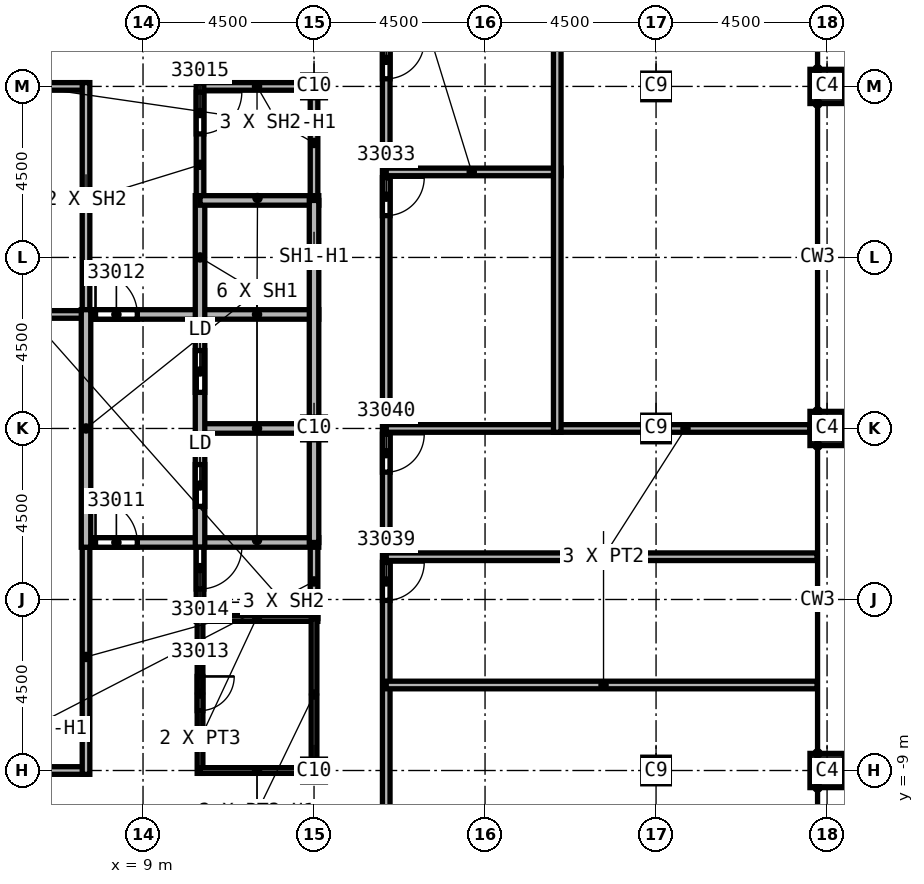
"""IFC4 building model, lengths in metres.
Left out: names, types, materials, properties, quantities, classifications, styles, units other than length and angle.
Written with IfcOpenShell. Run it as: python <this file> out.ifc"""

import sys

from ifc_helpers import new_model, si_unit, direction, frame, frame_2d, origin, origin_2d, place, context, subcontext, project, spatial, rectangle, extrude, element, fill, save


model = new_model("IFC4")
c1 = context("Model", 3, precision=1e-05, world=origin(), true_north=direction((0.0, 1.0)))
c2 = subcontext(c1, "Body", "Model", "MODEL_VIEW")
j1 = project(units=[si_unit("LENGTHUNIT", "METRE"), si_unit("PLANEANGLEUNIT", "RADIAN")], contexts=[c1])
p1 = place(None, origin())
s1 = spatial("IfcSite", under=j1, at=p1, CompositionType="ELEMENT")
p2 = place(p1, origin())
s2 = spatial("IfcBuilding", under=s1, at=p2, CompositionType="ELEMENT")
p3 = place(p2, frame((0.0, 0.0, 361.0)))
s3 = spatial("IfcBuildingStorey", under=s2, at=p3, CompositionType="ELEMENT", Elevation=361.0)
for number, where, z_axis, x_axis in (
    (1, (22.5, 0.0, 0.0), (0.0, 0.0, 1.0), (1.0, 0.0, 0.0)),
    (2, (22.5, 9.0, 0.0), (0.0, 0.0, 1.0), (1.0, 0.0, 0.0)),
    (3, (22.5, -9.0, 0.0), (0.0, 0.0, 1.0), (1.0, 0.0, 0.0)),
):
    element("IfcColumn", number, at=place(p3, frame(where, z_axis=z_axis, x_axis=x_axis)), inside=s3, PredefinedType="COLUMN", context=c2, shape_type="SweptSolid", body=[
        extrude(rectangle(XDim=0.7, YDim=0.7, at=origin_2d()), origin(), (0.0, 0.0, 1.0), 4.6),
    ])
for number, where, z_axis, x_axis in (
    (4, (13.5, 0.0, 0.0), (0.0, 0.0, 1.0), (1.0, 0.0, 0.0)),
    (5, (13.5, 9.0, 0.0), (0.0, 0.0, 1.0), (1.0, 0.0, 0.0)),
    (6, (13.5, -9.0, 0.0), (0.0, 0.0, 1.0), (1.0, 0.0, 0.0)),
):
    element("IfcColumn", number, at=place(p3, frame(where, z_axis=z_axis, x_axis=x_axis)), inside=s3, PredefinedType="COLUMN", context=c2, shape_type="SweptSolid", body=[
        extrude(rectangle(XDim=0.6, YDim=0.6, at=origin_2d()), origin(), (0.0, 0.0, 1.0), 4.6),
    ])
for number, where, z_axis, x_axis in (
    (7, (27.0, 0.0, 0.0), (0.0, 0.0, 1.0), (0.0, 1.0, 0.0)),
    (8, (27.0, 9.0, 0.0), (0.0, 0.0, 1.0), (0.0, 1.0, 0.0)),
    (9, (27.0, -9.0, 0.0), (0.0, 0.0, 1.0), (0.0, 1.0, 0.0)),
):
    element("IfcColumn", number, at=place(p3, frame(where, z_axis=z_axis, x_axis=x_axis)), inside=s3, PredefinedType="COLUMN", context=c2, shape_type="SweptSolid", body=[
        extrude(rectangle(XDim=0.9, YDim=0.9, at=origin_2d()), origin(), (0.0, 0.0, 1.0), 4.6),
    ])
p4 = place(p3, frame((15.4, 27.636, 0.0), z_axis=(0.0, 0.0, 1.0), x_axis=(0.0, -1.0, 0.0)))
e10 = element("IfcWall", 10, at=p4, inside=s3, PredefinedType="PARTITIONING", context=c2, shape_type="SweptSolid", body=[
    extrude(rectangle(XDim=55.272, YDim=0.2, at=frame_2d((27.636, 0.0))), origin(), (0.0, 0.0, 1.0), 4.15),
])
p5 = place(p4, frame((21.036, 0.0, 0.0)))
e11 = element("IfcOpeningElement", 11, at=p5, cuts=e10, PredefinedType="OPENING", context=c2, shape_type="SweptSolid", body=[
    extrude(rectangle(XDim=1.0, YDim=2.1, at=frame_2d((0.5, 1.05))), frame((0.0, 0.1, 0.0), z_axis=(0.0, -1.0, 0.0), x_axis=(1.0, 0.0, 0.0)), (0.0, 0.0, 1.0), 0.2),
])
p6 = place(p4, frame((17.436, 0.0, 0.0)))
e12 = element("IfcOpeningElement", 12, at=p6, cuts=e10, PredefinedType="OPENING", context=c2, shape_type="SweptSolid", body=[
    extrude(rectangle(XDim=1.0, YDim=2.1, at=frame_2d((0.5, 1.05))), frame((0.0, 0.1, 0.0), z_axis=(0.0, -1.0, 0.0), x_axis=(1.0, 0.0, 0.0)), (0.0, 0.0, 1.0), 0.2),
])
p7 = place(p4, frame((5.2, 0.0, 0.0)))
e13 = element("IfcOpeningElement", 13, at=p7, cuts=e10, PredefinedType="OPENING", context=c2, shape_type="SweptSolid", body=[
    extrude(rectangle(XDim=1.0, YDim=2.1, at=frame_2d((0.5, 1.05))), frame((0.0, 0.1, 0.0), z_axis=(0.0, -1.0, 0.0), x_axis=(1.0, 0.0, 0.0)), (0.0, 0.0, 1.0), 0.2),
])
p8 = place(p4, frame((49.836, 0.0, 0.0)))
e14 = element("IfcOpeningElement", 14, at=p8, cuts=e10, PredefinedType="OPENING", context=c2, shape_type="SweptSolid", body=[
    extrude(rectangle(XDim=1.0, YDim=2.1, at=frame_2d((0.5, 1.05))), frame((0.0, 0.1, 0.0), z_axis=(0.0, -1.0, 0.0), x_axis=(1.0, 0.0, 0.0)), (0.0, 0.0, 1.0), 0.2),
])
p9 = place(p4, frame((38.586, 0.0, 0.0)))
e15 = element("IfcOpeningElement", 15, at=p9, cuts=e10, PredefinedType="OPENING", context=c2, shape_type="SweptSolid", body=[
    extrude(rectangle(XDim=1.0, YDim=2.1, at=frame_2d((0.5, 1.05))), frame((0.0, 0.1, 0.0), z_axis=(0.0, -1.0, 0.0), x_axis=(1.0, 0.0, 0.0)), (0.0, 0.0, 1.0), 0.2),
])
p10 = place(p4, frame((31.161, 0.0, 0.0)))
e16 = element("IfcOpeningElement", 16, at=p10, cuts=e10, PredefinedType="OPENING", context=c2, shape_type="SweptSolid", body=[
    extrude(rectangle(XDim=1.0, YDim=2.1, at=frame_2d((0.5, 1.05))), frame((0.0, 0.1, 0.0), z_axis=(0.0, -1.0, 0.0), x_axis=(1.0, 0.0, 0.0)), (0.0, 0.0, 1.0), 0.2),
])
p11 = place(p4, frame((27.786, 0.0, 0.0)))
e17 = element("IfcOpeningElement", 17, at=p11, cuts=e10, PredefinedType="OPENING", context=c2, shape_type="SweptSolid", body=[
    extrude(rectangle(XDim=1.0, YDim=2.1, at=frame_2d((0.5, 1.05))), frame((0.0, 0.1, 0.0), z_axis=(0.0, -1.0, 0.0), x_axis=(1.0, 0.0, 0.0)), (0.0, 0.0, 1.0), 0.2),
])
for number, where, z_axis, x_axis in (
    (18, (15.4, -6.75, 0.0), (0.0, 0.0, 1.0), (1.0, 0.0, 0.0)),
    (19, (15.4, -3.375, 0.0), (0.0, 0.0, 1.0), (1.0, 0.0, 0.0)),
):
    element("IfcWall", number, at=place(p3, frame(where, z_axis=z_axis, x_axis=x_axis)), inside=s3, PredefinedType="PARTITIONING", context=c2, shape_type="SweptSolid", body=[
        extrude(rectangle(XDim=11.336, YDim=0.2, at=frame_2d((5.668, 0.0))), origin(), (0.0, 0.0, 1.0), 4.15),
    ])
p12 = place(p3, frame((15.4, 6.75, 0.0), z_axis=(0.0, 0.0, 1.0), x_axis=(1.0, 0.0, 0.0)))
e20 = element("IfcWall", 20, at=p12, inside=s3, PredefinedType="PARTITIONING", context=c2, shape_type="SweptSolid", body=[
    extrude(rectangle(XDim=4.6, YDim=0.2, at=frame_2d((2.3, 0.0))), origin(), (0.0, 0.0, 1.0), 4.15),
])
p13 = place(p3, frame((26.55, 0.0, 0.0), z_axis=(0.0, 0.0, 1.0), x_axis=(-1.0, 0.0, 0.0)))
e21 = element("IfcWall", 21, at=p13, inside=s3, PredefinedType="PARTITIONING", context=c2, shape_type="SweptSolid", body=[
    extrude(rectangle(XDim=11.15, YDim=0.2, at=frame_2d((5.575, 0.0))), origin(), (0.0, 0.0, 1.0), 4.15),
])
p14 = place(p3, frame((19.9, 18.1, 0.0), z_axis=(0.0, 0.0, 1.0), x_axis=(0.0, -1.0, 0.0)))
e22 = element("IfcWall", 22, at=p14, inside=s3, PredefinedType="PARTITIONING", context=c2, shape_type="SweptSolid", body=[
    extrude(rectangle(XDim=18.2, YDim=0.2, at=frame_2d((9.1, 0.0))), origin(), (0.0, 0.0, 1.0), 4.15),
])
p15 = place(p14, frame((7.0, 0.0, 0.0)))
e23 = element("IfcOpeningElement", 23, at=p15, cuts=e22, PredefinedType="OPENING", context=c2, shape_type="SweptSolid", body=[
    extrude(rectangle(XDim=1.0, YDim=2.1, at=frame_2d((0.5, 1.05))), frame((0.0, 0.1, 0.0), z_axis=(0.0, -1.0, 0.0), x_axis=(1.0, 0.0, 0.0)), (0.0, 0.0, 1.0), 0.2),
])
p16 = place(p3, frame((4.4, 3.0, 0.0), z_axis=(0.0, 0.0, 1.0), x_axis=(1.0, 0.0, 0.0)))
e24 = element("IfcWall", 24, at=p16, inside=s3, PredefinedType="SOLIDWALL", context=c2, shape_type="SweptSolid", body=[
    extrude(rectangle(XDim=3.225, YDim=0.2, at=frame_2d((1.613, 0.0))), origin(), (0.0, 0.0, 1.0), 4.15),
])
for number, where, z_axis, x_axis in (
    (25, (4.5, 9.0, 0.0), (0.0, 0.0, 1.0), (1.0, 0.0, 0.0)),
    (26, (7.5, -9.0, 0.0), (0.0, 0.0, 1.0), (-1.0, 0.0, 0.0)),
):
    element("IfcWall", number, at=place(p3, frame(where, z_axis=z_axis, x_axis=x_axis)), inside=s3, PredefinedType="SOLIDWALL", context=c2, shape_type="SweptSolid", body=[
        extrude(rectangle(XDim=3.0, YDim=0.2, at=frame_2d((1.5, 0.0))), origin(), (0.0, 0.0, 1.0), 3.838),
    ])
for number, where, z_axis, x_axis in (
    (27, (7.5, -2.875, 0.0), (0.0, 0.0, 1.0), (0.0, -1.0, 0.0)),
    (28, (7.5, 9.1, 0.0), (0.0, 0.0, 1.0), (0.0, -1.0, 0.0)),
):
    element("IfcWall", number, at=place(p3, frame(where, z_axis=z_axis, x_axis=x_axis)), inside=s3, PredefinedType="SOLIDWALL", context=c2, shape_type="SweptSolid", body=[
        extrude(rectangle(XDim=6.225, YDim=0.2, at=frame_2d((3.113, 0.0))), origin(), (0.0, 0.0, 1.0), 4.15),
    ])
p17 = place(p3, frame((10.5, -2.875, 0.0), z_axis=(0.0, 0.0, 1.0), x_axis=(0.0, -1.0, 0.0)))
e29 = element("IfcWall", 29, at=p17, inside=s3, PredefinedType="SOLIDWALL", context=c2, shape_type="SweptSolid", body=[
    extrude(rectangle(XDim=2.2, YDim=0.2, at=frame_2d((1.1, 0.0))), origin(), (0.0, 0.0, 1.0), 4.15),
])
p18 = place(p17, frame((0.25, 0.0, 0.0)))
e30 = element("IfcOpeningElement", 30, at=p18, cuts=e29, PredefinedType="OPENING", context=c2, shape_type="SweptSolid", body=[
    extrude(rectangle(XDim=1.1, YDim=2.1, at=frame_2d((0.55, 1.05))), frame((0.0, 0.1, 0.0), z_axis=(0.0, -1.0, 0.0), x_axis=(1.0, 0.0, 0.0)), (0.0, 0.0, 1.0), 0.2),
])
p19 = place(p3, frame((10.5, 9.0, 0.0), z_axis=(0.0, 0.0, 1.0), x_axis=(1.0, 0.0, 0.0)))
e31 = element("IfcWall", 31, at=p19, inside=s3, PredefinedType="SOLIDWALL", context=c2, shape_type="SweptSolid", body=[
    extrude(rectangle(XDim=3.0, YDim=0.2, at=frame_2d((1.5, 0.0))), origin(), (0.0, 0.0, 1.0), 3.838),
])
p20 = place(p3, frame((10.5, 9.1, 0.0), z_axis=(0.0, 0.0, 1.0), x_axis=(0.0, -1.0, 0.0)))
e32 = element("IfcWall", 32, at=p20, inside=s3, PredefinedType="SOLIDWALL", context=c2, shape_type="SweptSolid", body=[
    extrude(rectangle(XDim=3.225, YDim=0.2, at=frame_2d((1.613, 0.0))), origin(), (0.0, 0.0, 1.0), 4.15),
])
p21 = place(p20, frame((0.25, 0.0, 0.0)))
e33 = element("IfcOpeningElement", 33, at=p21, cuts=e32, PredefinedType="OPENING", context=c2, shape_type="SweptSolid", body=[
    extrude(rectangle(XDim=1.1, YDim=2.1, at=frame_2d((0.55, 1.05))), frame((0.0, 0.1, 0.0), z_axis=(0.0, -1.0, 0.0), x_axis=(1.0, 0.0, 0.0)), (0.0, 0.0, 1.0), 0.2),
])
p22 = place(p3, frame((13.5, -3.0, 0.0), z_axis=(0.0, 0.0, 1.0), x_axis=(0.0, -1.0, 0.0)))
e34 = element("IfcWall", 34, at=p22, inside=s3, PredefinedType="SOLIDWALL", context=c2, shape_type="SweptSolid", body=[
    extrude(rectangle(XDim=2.0, YDim=0.2, at=frame_2d((1.0, 0.0))), origin(), (0.0, 0.0, 1.0), 3.838),
])
p23 = place(p3, frame((13.5, 9.1, 0.0), z_axis=(0.0, 0.0, 1.0), x_axis=(0.0, -1.0, 0.0)))
e35 = element("IfcWall", 35, at=p23, inside=s3, PredefinedType="SOLIDWALL", context=c2, shape_type="SweptSolid", body=[
    extrude(rectangle(XDim=3.1, YDim=0.2, at=frame_2d((1.55, 0.0))), origin(), (0.0, 0.0, 1.0), 3.838),
])
p24 = place(p3, frame((7.5, -3.0, 0.0), z_axis=(0.0, 0.0, 1.0), x_axis=(1.0, 0.0, 0.0)))
e36 = element("IfcWall", 36, at=p24, inside=s3, PredefinedType="SOLIDWALL", context=c2, shape_type="SweptSolid", body=[
    extrude(rectangle(XDim=6.125, YDim=0.25, at=frame_2d((3.062, 0.0))), origin(), (0.0, 0.0, 1.0), 4.15),
])
p25 = place(p24, frame((0.25, 0.0, 0.0)))
e37 = element("IfcOpeningElement", 37, at=p25, cuts=e36, PredefinedType="OPENING", context=c2, shape_type="SweptSolid", body=[
    extrude(rectangle(XDim=1.1, YDim=2.1, at=frame_2d((0.55, 1.05))), frame((0.0, 0.125, 0.0), z_axis=(0.0, -1.0, 0.0), x_axis=(1.0, 0.0, 0.0)), (0.0, 0.0, 1.0), 0.25),
])
p26 = place(p3, frame((7.5, 3.0, 0.0), z_axis=(0.0, 0.0, 1.0), x_axis=(1.0, 0.0, 0.0)))
e38 = element("IfcWall", 38, at=p26, inside=s3, PredefinedType="SOLIDWALL", context=c2, shape_type="SweptSolid", body=[
    extrude(rectangle(XDim=6.125, YDim=0.25, at=frame_2d((3.062, 0.0))), origin(), (0.0, 0.0, 1.0), 4.15),
])
p27 = place(p26, frame((0.25, 0.0, 0.0)))
e39 = element("IfcOpeningElement", 39, at=p27, cuts=e38, PredefinedType="OPENING", context=c2, shape_type="SweptSolid", body=[
    extrude(rectangle(XDim=1.1, YDim=2.1, at=frame_2d((0.55, 1.05))), frame((0.0, 0.125, 0.0), z_axis=(0.0, -1.0, 0.0), x_axis=(1.0, 0.0, 0.0)), (0.0, 0.0, 1.0), 0.25),
])
p28 = place(p3, frame((7.5, 3.125, 0.0), z_axis=(0.0, 0.0, 1.0), x_axis=(0.0, -1.0, 0.0)))
e40 = element("IfcWall", 40, at=p28, inside=s3, PredefinedType="SOLIDWALL", context=c2, shape_type="SweptSolid", body=[
    extrude(rectangle(XDim=6.25, YDim=0.25, at=frame_2d((3.125, 0.0))), origin(), (0.0, 0.0, 1.0), 4.15),
])
p29 = place(p3, frame((10.5, 0.0, 0.0), z_axis=(0.0, 0.0, 1.0), x_axis=(1.0, 0.0, 0.0)))
e41 = element("IfcWall", 41, at=p29, inside=s3, PredefinedType="SOLIDWALL", context=c2, shape_type="SweptSolid", body=[
    extrude(rectangle(XDim=3.125, YDim=0.25, at=frame_2d((1.562, 0.0))), origin(), (0.0, 0.0, 1.0), 4.15),
])
p30 = place(p3, frame((10.5, 6.125, 0.0), z_axis=(0.0, 0.0, 1.0), x_axis=(0.0, -1.0, 0.0)))
e42 = element("IfcWall", 42, at=p30, inside=s3, PredefinedType="SOLIDWALL", context=c2, shape_type="SweptSolid", body=[
    extrude(rectangle(XDim=9.25, YDim=0.25, at=frame_2d((4.625, 0.0))), origin(), (0.0, 0.0, 1.0), 4.15),
])
p31 = place(p30, frame((7.075, 0.0, 0.0)))
e43 = element("IfcOpeningElement", 43, at=p31, cuts=e42, PredefinedType="OPENING", context=c2, shape_type="SweptSolid", body=[
    extrude(rectangle(XDim=1.1, YDim=2.1, at=frame_2d((0.55, 1.05))), frame((0.0, 0.125, 0.0), z_axis=(0.0, -1.0, 0.0), x_axis=(1.0, 0.0, 0.0)), (0.0, 0.0, 1.0), 0.25),
])
p32 = place(p30, frame((4.075, 0.0, 0.0)))
e44 = element("IfcOpeningElement", 44, at=p32, cuts=e42, PredefinedType="OPENING", context=c2, shape_type="SweptSolid", body=[
    extrude(rectangle(XDim=1.1, YDim=2.1, at=frame_2d((0.55, 1.05))), frame((0.0, 0.125, 0.0), z_axis=(0.0, -1.0, 0.0), x_axis=(1.0, 0.0, 0.0)), (0.0, 0.0, 1.0), 0.25),
])
p33 = place(p3, frame((10.5, 6.0, 0.0), z_axis=(0.0, 0.0, 1.0), x_axis=(1.0, 0.0, 0.0)))
e45 = element("IfcWall", 45, at=p33, inside=s3, PredefinedType="SOLIDWALL", context=c2, shape_type="SweptSolid", body=[
    extrude(rectangle(XDim=3.125, YDim=0.25, at=frame_2d((1.562, 0.0))), origin(), (0.0, 0.0, 1.0), 4.15),
])
p34 = place(p3, frame((13.5, 6.0, 0.0), z_axis=(0.0, 0.0, 1.0), x_axis=(0.0, -1.0, 0.0)))
e46 = element("IfcWall", 46, at=p34, inside=s3, PredefinedType="SOLIDWALL", context=c2, shape_type="SweptSolid", body=[
    extrude(rectangle(XDim=9.0, YDim=0.25, at=frame_2d((4.5, 0.0))), origin(), (0.0, 0.0, 1.0), 3.838),
])
p35 = place(p3, frame((10.5, -5.0, 0.0), z_axis=(0.0, 0.0, 1.0), x_axis=(1.0, 0.0, 0.0)))
e47 = element("IfcWall", 47, at=p35, inside=s3, PredefinedType="PARTITIONING", context=c2, shape_type="SweptSolid", body=[
    extrude(rectangle(XDim=3.1, YDim=0.15, at=frame_2d((1.55, 0.0))), origin(), (0.0, 0.0, 1.0), 4.15),
])
p36 = place(p3, frame((10.5, -4.925, 0.0), z_axis=(0.0, 0.0, 1.0), x_axis=(0.0, -1.0, 0.0)))
e48 = element("IfcWall", 48, at=p36, inside=s3, PredefinedType="PARTITIONING", context=c2, shape_type="SweptSolid", body=[
    extrude(rectangle(XDim=4.15, YDim=0.15, at=frame_2d((2.075, 0.0))), origin(), (0.0, 0.0, 1.0), 4.15),
])
p37 = place(p36, frame((1.6, 0.0, 0.0)))
e49 = element("IfcOpeningElement", 49, at=p37, cuts=e48, PredefinedType="OPENING", context=c2, shape_type="SweptSolid", body=[
    extrude(rectangle(XDim=0.9, YDim=2.1, at=frame_2d((0.45, 1.05))), frame((0.0, 0.075, 0.0), z_axis=(0.0, -1.0, 0.0), x_axis=(1.0, 0.0, 0.0)), (0.0, 0.0, 1.0), 0.15),
])
p38 = place(p3, frame((13.5, -9.0, 0.0), z_axis=(0.0, 0.0, 1.0), x_axis=(-1.0, 0.0, 0.0)))
e50 = element("IfcWall", 50, at=p38, inside=s3, PredefinedType="PARTITIONING", context=c2, shape_type="SweptSolid", body=[
    extrude(rectangle(XDim=3.0, YDim=0.15, at=frame_2d((1.5, 0.0))), origin(), (0.0, 0.0, 1.0), 3.838),
])
p39 = place(p3, frame((13.5, -5.0, 0.0), z_axis=(0.0, 0.0, 1.0), x_axis=(0.0, -1.0, 0.0)))
e51 = element("IfcWall", 51, at=p39, inside=s3, PredefinedType="PARTITIONING", context=c2, shape_type="SweptSolid", body=[
    extrude(rectangle(XDim=4.075, YDim=0.15, at=frame_2d((2.038, 0.0))), origin(), (0.0, 0.0, 1.0), 3.838),
])
p40 = place(p25, origin())
e52 = element("IfcDoor", 52, at=p40, inside=s3, OperationType="SINGLE_SWING_RIGHT", PredefinedType="DOOR", context=c2, shape_type="SweptSolid", body=[
    extrude(rectangle(XDim=1.1, YDim=2.1, at=frame_2d((0.55, 1.05))), frame((0.0, 0.025, 0.0), z_axis=(0.0, -1.0, 0.0), x_axis=(1.0, 0.0, 0.0)), (0.0, 0.0, 1.0), 0.05),
])
fill(e37, e52)
p41 = place(p27, origin())
e53 = element("IfcDoor", 53, at=p41, inside=s3, OperationType="SINGLE_SWING_LEFT", PredefinedType="DOOR", context=c2, shape_type="SweptSolid", body=[
    extrude(rectangle(XDim=1.1, YDim=2.1, at=frame_2d((0.55, 1.05))), frame((0.0, 0.025, 0.0), z_axis=(0.0, -1.0, 0.0), x_axis=(1.0, 0.0, 0.0)), (0.0, 0.0, 1.0), 0.05),
])
fill(e39, e53)
p42 = place(p37, origin())
e54 = element("IfcDoor", 54, at=p42, inside=s3, OperationType="SINGLE_SWING_RIGHT", PredefinedType="DOOR", context=c2, shape_type="SweptSolid", body=[
    extrude(rectangle(XDim=0.9, YDim=2.1, at=frame_2d((0.45, 1.05))), frame((0.0, 0.025, 0.0), z_axis=(0.0, -1.0, 0.0), x_axis=(1.0, 0.0, 0.0)), (0.0, 0.0, 1.0), 0.05),
])
fill(e49, e54)
p43 = place(p18, origin())
e55 = element("IfcDoor", 55, at=p43, inside=s3, OperationType="SINGLE_SWING_LEFT", PredefinedType="DOOR", context=c2, shape_type="SweptSolid", body=[
    extrude(rectangle(XDim=1.1, YDim=2.1, at=frame_2d((0.55, 1.05))), frame((0.0, 0.025, 0.0), z_axis=(0.0, -1.0, 0.0), x_axis=(1.0, 0.0, 0.0)), (0.0, 0.0, 1.0), 0.05),
])
fill(e30, e55)
p44 = place(p21, origin())
e56 = element("IfcDoor", 56, at=p44, inside=s3, OperationType="SINGLE_SWING_RIGHT", PredefinedType="DOOR", context=c2, shape_type="SweptSolid", body=[
    extrude(rectangle(XDim=1.1, YDim=2.1, at=frame_2d((0.55, 1.05))), frame((0.0, 0.025, 0.0), z_axis=(0.0, -1.0, 0.0), x_axis=(1.0, 0.0, 0.0)), (0.0, 0.0, 1.0), 0.05),
])
fill(e33, e56)
p45 = place(p5, origin())
e57 = element("IfcDoor", 57, at=p45, inside=s3, OperationType="SINGLE_SWING_RIGHT", PredefinedType="DOOR", context=c2, shape_type="SweptSolid", body=[
    extrude(rectangle(XDim=1.0, YDim=2.1, at=frame_2d((0.5, 1.05))), frame((0.0, 0.025, 0.0), z_axis=(0.0, -1.0, 0.0), x_axis=(1.0, 0.0, 0.0)), (0.0, 0.0, 1.0), 0.05),
])
fill(e11, e57)
p46 = place(p6, origin())
e58 = element("IfcDoor", 58, at=p46, inside=s3, OperationType="SINGLE_SWING_LEFT", PredefinedType="DOOR", context=c2, shape_type="SweptSolid", body=[
    extrude(rectangle(XDim=1.0, YDim=2.1, at=frame_2d((0.5, 1.05))), frame((0.0, 0.025, 0.0), z_axis=(0.0, -1.0, 0.0), x_axis=(1.0, 0.0, 0.0)), (0.0, 0.0, 1.0), 0.05),
])
fill(e12, e58)
p47 = place(p10, origin())
e59 = element("IfcDoor", 59, at=p47, inside=s3, OperationType="SINGLE_SWING_RIGHT", PredefinedType="DOOR", context=c2, shape_type="SweptSolid", body=[
    extrude(rectangle(XDim=1.0, YDim=2.1, at=frame_2d((0.5, 1.05))), frame((0.0, 0.025, 0.0), z_axis=(0.0, -1.0, 0.0), x_axis=(1.0, 0.0, 0.0)), (0.0, 0.0, 1.0), 0.05),
])
fill(e16, e59)
p48 = place(p11, origin())
e60 = element("IfcDoor", 60, at=p48, inside=s3, OperationType="SINGLE_SWING_LEFT", PredefinedType="DOOR", context=c2, shape_type="SweptSolid", body=[
    extrude(rectangle(XDim=1.0, YDim=2.1, at=frame_2d((0.5, 1.05))), frame((0.0, 0.025, 0.0), z_axis=(0.0, -1.0, 0.0), x_axis=(1.0, 0.0, 0.0)), (0.0, 0.0, 1.0), 0.05),
])
fill(e17, e60)
p49 = place(p31, origin())
e61 = element("IfcDoor", 61, at=p49, inside=s3, OperationType="SLIDING_TO_LEFT", PredefinedType="DOOR", context=c2, shape_type="SweptSolid", body=[
    extrude(rectangle(XDim=1.1, YDim=2.1, at=frame_2d((0.55, 1.05))), frame((0.0, 0.025, 0.0), z_axis=(0.0, -1.0, 0.0), x_axis=(1.0, 0.0, 0.0)), (0.0, 0.0, 1.0), 0.05),
])
fill(e43, e61)
p50 = place(p32, origin())
e62 = element("IfcDoor", 62, at=p50, inside=s3, OperationType="SLIDING_TO_LEFT", PredefinedType="DOOR", context=c2, shape_type="SweptSolid", body=[
    extrude(rectangle(XDim=1.1, YDim=2.1, at=frame_2d((0.55, 1.05))), frame((0.0, 0.025, 0.0), z_axis=(0.0, -1.0, 0.0), x_axis=(1.0, 0.0, 0.0)), (0.0, 0.0, 1.0), 0.05),
])
fill(e44, e62)
save(model, sys.argv[1])
